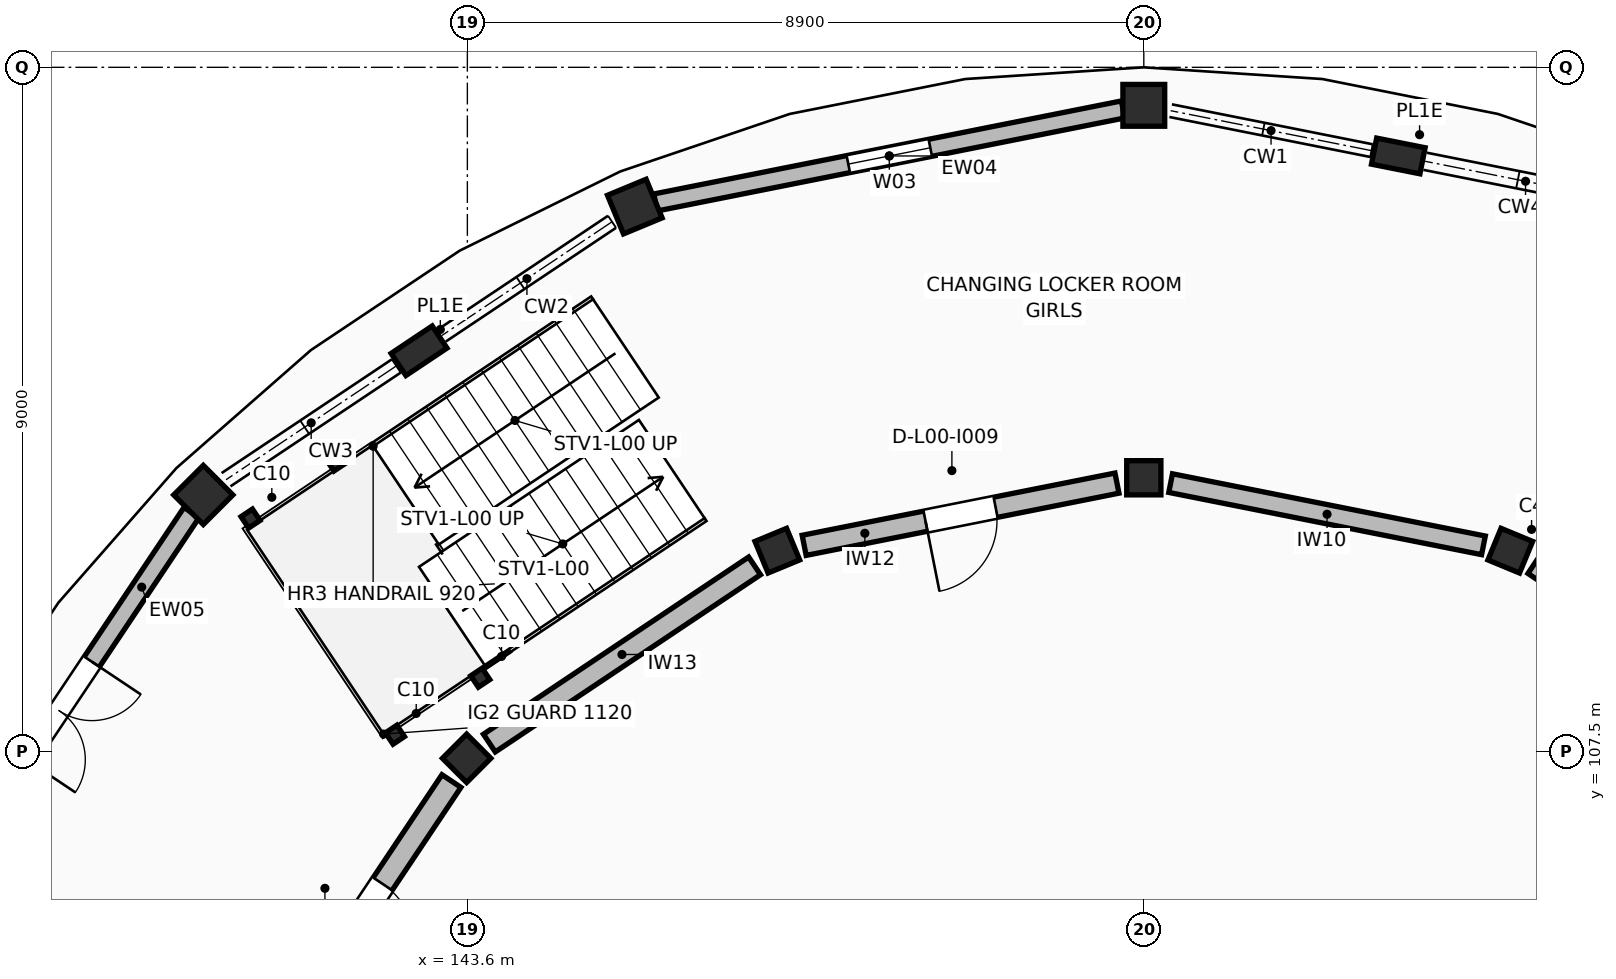
"""IFC4 building model, lengths in metres.
Left out: names, types, materials, properties, quantities, classifications, styles, units other than length and angle.
Written with IfcOpenShell. Run it as: python <this file> out.ifc"""

import sys

from ifc_helpers import new_model, si_unit, direction, frame, frame_2d, origin, origin_2d, place, context, subcontext, project, spatial, rectangle, hollow_rectangle, extrude, element, fill, save


model = new_model("IFC4")
c1 = context("Model", 3, precision=1e-05, world=origin(), true_north=direction((0.0, 1.0)))
c2 = subcontext(c1, "Body", "Model", "MODEL_VIEW")
j1 = project(units=[si_unit("LENGTHUNIT", "METRE"), si_unit("PLANEANGLEUNIT", "RADIAN")], contexts=[c1])
p1 = place(None, origin())
s1 = spatial("IfcSite", under=j1, at=p1, CompositionType="ELEMENT")
p2 = place(p1, origin())
s2 = spatial("IfcBuilding", under=s1, at=p2, CompositionType="ELEMENT")
p3 = place(p2, origin())
s3 = spatial("IfcBuildingStorey", under=s2, at=p3, CompositionType="ELEMENT", Elevation=0.0)
for number, where, z_axis, x_axis in (
    (1, (157.322, 110.141, 0.0), (0.0, 0.0, 1.0), (0.383, 0.924, 0.0)),
    (2, (152.5, 111.1, 0.0), (0.0, 0.0, 1.0), (0.0, 1.0, 0.0)),
):
    element("IfcColumn", number, at=place(p3, frame(where, z_axis=z_axis, x_axis=x_axis)), inside=s3, PredefinedType="COLUMN", context=c2, shape_type="SweptSolid", body=[
        extrude(rectangle(XDim=0.45, YDim=0.45, at=origin_2d()), origin(), (0.0, 0.0, 1.0), 4.42),
    ])
p4 = place(p3, frame((152.5, 116.0, 0.0), z_axis=(0.0, 0.0, 1.0), x_axis=(0.0, 1.0, 0.0)))
e3 = element("IfcColumn", 3, at=p4, inside=s3, PredefinedType="COLUMN", context=c2, shape_type="SweptSolid", body=[
    extrude(rectangle(XDim=0.55, YDim=0.55, at=origin_2d()), origin(), (0.0, 0.0, 1.0), 4.42),
])
p5 = place(p3, frame((147.678, 110.141, 0.0), z_axis=(0.0, 0.0, 1.0), x_axis=(-0.382683432365, 0.923879532511, 0.0)))
e4 = element("IfcColumn", 4, at=p5, inside=s3, PredefinedType="COLUMN", context=c2, shape_type="SweptSolid", body=[
    extrude(rectangle(XDim=0.45, YDim=0.45, at=origin_2d()), origin(), (0.0, 0.0, 1.0), 4.42),
])
p6 = place(p3, frame((145.803, 114.668, 0.0), z_axis=(0.0, 0.0, 1.0), x_axis=(-0.382683432365, 0.923879532511, 0.0)))
e5 = element("IfcColumn", 5, at=p6, inside=s3, PredefinedType="COLUMN", context=c2, shape_type="SweptSolid", body=[
    extrude(rectangle(XDim=0.55, YDim=0.55, at=origin_2d()), origin(), (0.0, 0.0, 1.0), 4.42),
])
p7 = place(p3, frame((143.591, 107.409, 0.0), z_axis=(0.0, 0.0, 1.0), x_axis=(-0.707106781187, 0.707106781187, 0.0)))
e6 = element("IfcColumn", 6, at=p7, inside=s3, PredefinedType="COLUMN", context=c2, shape_type="SweptSolid", body=[
    extrude(rectangle(XDim=0.45, YDim=0.45, at=origin_2d()), origin(), (0.0, 0.0, 1.0), 4.42),
])
p8 = place(p3, frame((140.126, 110.874, 0.0), z_axis=(0.0, 0.0, 1.0), x_axis=(-0.707106781187, 0.707106781187, 0.0)))
e7 = element("IfcColumn", 7, at=p8, inside=s3, PredefinedType="COLUMN", context=c2, shape_type="SweptSolid", body=[
    extrude(rectangle(XDim=0.55, YDim=0.55, at=origin_2d()), origin(), (0.0, 0.0, 1.0), 4.42),
])
for number, where, z_axis, x_axis in (
    (8, (155.848, 115.334, 0.0), (0.0, 0.0, 1.0), (0.195, 0.981, 0.0)),
    (9, (142.964, 112.771, 0.0), (0.0, 0.0, 1.0), (-0.556, 0.831, 0.0)),
):
    element("IfcColumn", number, at=place(p3, frame(where, z_axis=z_axis, x_axis=x_axis)), inside=s3, PredefinedType="PILASTER", context=c2, shape_type="SweptSolid", body=[
        extrude(rectangle(XDim=0.35, YDim=0.65, at=origin_2d()), origin(), (0.0, 0.0, 1.0), 4.42),
    ])
p9 = place(p3, frame((152.227, 115.946, 0.0), z_axis=(0.0, 0.0, 1.0), x_axis=(-0.980785242574, -0.195090512195, 0.0)))
e10 = element("IfcWall", 10, at=p9, inside=s3, PredefinedType="STANDARD", context=c2, shape_type="SweptSolid", body=[
    extrude(rectangle(XDim=6.272, YDim=0.228, at=frame_2d((3.136, 0.0))), origin(), (0.0, 0.0, 1.0), 3.4),
])
p10 = place(p9, frame((2.586, 0.0, 0.95)))
e11 = element("IfcOpeningElement", 11, at=p10, cuts=e10, PredefinedType="OPENING", context=c2, shape_type="SweptSolid", body=[
    extrude(rectangle(XDim=1.1, YDim=1.45, at=frame_2d((0.55, 0.725))), frame((0.0, 0.124, 0.0), z_axis=(0.0, -1.0, 0.0), x_axis=(1.0, 0.0, 0.0)), (0.0, 0.0, 1.0), 0.248),
])
p11 = place(p3, frame((139.971, 110.643, 0.0), z_axis=(0.0, 0.0, 1.0), x_axis=(-0.555571204893, -0.831468962917, 0.0)))
e12 = element("IfcWall", 12, at=p11, inside=s3, PredefinedType="STANDARD", context=c2, shape_type="SweptSolid", body=[
    extrude(rectangle(XDim=6.272, YDim=0.24, at=frame_2d((3.136, 0.0))), origin(), (0.0, 0.0, 1.0), 3.4),
])
p12 = place(p11, frame((2.361, 0.0, 0.0)))
e13 = element("IfcOpeningElement", 13, at=p12, cuts=e12, PredefinedType="OPENING", context=c2, shape_type="SweptSolid", body=[
    extrude(rectangle(XDim=1.55, YDim=2.22, at=frame_2d((0.775, 1.11))), frame((0.0, 0.13, 0.0), z_axis=(0.0, -1.0, 0.0), x_axis=(1.0, 0.0, 0.0)), (0.0, 0.0, 1.0), 0.26),
])
for number, where, z_axis, x_axis in (
    (14, (141.87, 111.313, 0.0), (0.0, 0.0, 1.0), (-0.831, -0.556, 0.0)),
    (15, (143.77, 108.47, 0.0), (0.0, 0.0, 1.0), (-0.831, -0.556, 0.0)),
    (16, (140.747, 110.563, 0.0), (0.0, 0.0, 1.0), (-0.831, -0.556, 0.0)),
    (17, (142.647, 107.72, 0.0), (0.0, 0.0, 1.0), (-0.831, -0.556, 0.0)),
):
    element("IfcColumn", number, at=place(p3, frame(where, z_axis=z_axis, x_axis=x_axis)), inside=s3, PredefinedType="COLUMN", context=c2, shape_type="SweptSolid", body=[
        extrude(hollow_rectangle(XDim=0.18, YDim=0.18, WallThickness=0.01, InnerFilletRadius=0.01, OuterFilletRadius=0.02, at=origin_2d()), origin(), (0.0, 0.0, 1.0), 2.015),
    ])
p13 = place(p3, frame((161.11, 107.61, 0.0), z_axis=(0.0, 0.0, 1.0), x_axis=(-0.831468024304, 0.55557260962, 0.0)))
e18 = element("IfcWall", 18, at=p13, inside=s3, PredefinedType="STANDARD", context=c2, shape_type="SweptSolid", body=[
    extrude(rectangle(XDim=4.196, YDim=0.24, at=frame_2d((2.098, 0.0))), origin(), (0.0, 0.0, 1.0), 3.38),
])
p14 = place(p13, frame((1.648, 0.0, 0.0)))
e19 = element("IfcOpeningElement", 19, at=p14, cuts=e18, PredefinedType="OPENING", context=c2, shape_type="SweptSolid", body=[
    extrude(rectangle(XDim=0.9, YDim=2.24, at=frame_2d((0.45, 1.12))), frame((0.0, 0.13, 0.0), z_axis=(0.0, -1.0, 0.0), x_axis=(1.0, 0.0, 0.0)), (0.0, 0.0, 1.0), 0.26),
])
p15 = place(p3, frame((156.969, 110.211, 0.0), z_axis=(0.0, 0.0, 1.0), x_axis=(-0.980788226851, 0.195075508639, 0.0)))
e20 = element("IfcWall", 20, at=p15, inside=s3, PredefinedType="STANDARD", context=c2, shape_type="SweptSolid", body=[
    extrude(rectangle(XDim=4.196, YDim=0.25, at=frame_2d((2.098, 0.0))), origin(), (0.0, 0.0, 1.0), 3.38),
])
p16 = place(p3, frame((152.147, 111.03, 0.0), z_axis=(0.0, 0.0, 1.0), x_axis=(-0.980788226851, -0.195075508639, 0.0)))
e21 = element("IfcWall", 21, at=p16, inside=s3, PredefinedType="STANDARD", context=c2, shape_type="SweptSolid", body=[
    extrude(rectangle(XDim=4.196, YDim=0.27, at=frame_2d((2.098, 0.0))), origin(), (0.0, 0.0, 1.0), 3.38),
])
p17 = place(p16, frame((1.628, 0.0, 0.0)))
e22 = element("IfcOpeningElement", 22, at=p17, cuts=e21, PredefinedType="OPENING", context=c2, shape_type="SweptSolid", body=[
    extrude(rectangle(XDim=0.94, YDim=2.12, at=frame_2d((0.47, 1.06))), frame((0.0, 0.145, 0.0), z_axis=(0.0, -1.0, 0.0), x_axis=(1.0, 0.0, 0.0)), (0.0, 0.0, 1.0), 0.29),
])
p18 = place(p3, frame((147.379, 109.941, 0.0), z_axis=(0.0, 0.0, 1.0), x_axis=(-0.831468024304, -0.55557260962, 0.0)))
e23 = element("IfcWall", 23, at=p18, inside=s3, PredefinedType="STANDARD", context=c2, shape_type="SweptSolid", body=[
    extrude(rectangle(XDim=4.196, YDim=0.28, at=frame_2d((2.098, 0.0))), origin(), (0.0, 0.0, 1.0), 3.38),
])
p19 = place(p3, frame((143.39, 107.11, 0.0), z_axis=(0.0, 0.0, 1.0), x_axis=(-0.55557260962, -0.831468024304, 0.0)))
e24 = element("IfcWall", 24, at=p19, inside=s3, PredefinedType="STANDARD", context=c2, shape_type="SweptSolid", body=[
    extrude(rectangle(XDim=4.196, YDim=0.3, at=frame_2d((2.098, 0.0))), origin(), (0.0, 0.0, 1.0), 3.38),
])
p20 = place(p19, frame((1.628, 0.0, 0.0)))
e25 = element("IfcOpeningElement", 25, at=p20, cuts=e24, PredefinedType="OPENING", context=c2, shape_type="SweptSolid", body=[
    extrude(rectangle(XDim=0.94, YDim=2.24, at=frame_2d((0.47, 1.12))), frame((0.0, 0.16, 0.0), z_axis=(0.0, -1.0, 0.0), x_axis=(1.0, 0.0, 0.0)), (0.0, 0.0, 1.0), 0.32),
])
p21 = place(p10, origin())
e26 = element("IfcWindow", 26, at=p21, inside=s3, PartitioningType="SINGLE_PANEL", PredefinedType="WINDOW", context=c2, shape_type="SweptSolid", body=[
    extrude(rectangle(XDim=1.1, YDim=1.45, at=frame_2d((0.55, 0.725))), frame((0.0, 0.03, 0.0), z_axis=(0.0, -1.0, 0.0), x_axis=(1.0, 0.0, 0.0)), (0.0, 0.0, 1.0), 0.06),
])
fill(e11, e26)
p22 = place(p12, frame((1.55, 0.0, 0.0), z_axis=(0.0, 0.0, 1.0), x_axis=(-1.0, 0.0, 0.0)))
e27 = element("IfcDoor", 27, at=p22, inside=s3, OperationType="DOUBLE_DOOR_SINGLE_SWING", PredefinedType="DOOR", context=c2, shape_type="SweptSolid", body=[
    extrude(rectangle(XDim=1.55, YDim=2.22, at=frame_2d((0.775, 1.11))), frame((0.0, 0.025, 0.0), z_axis=(0.0, -1.0, 0.0), x_axis=(1.0, 0.0, 0.0)), (0.0, 0.0, 1.0), 0.05),
])
fill(e13, e27)
p23 = place(p17, frame((0.94, 0.0, 0.0), z_axis=(0.0, 0.0, 1.0), x_axis=(-1.0, 0.0, 0.0)))
e28 = element("IfcDoor", 28, at=p23, inside=s3, OperationType="SINGLE_SWING_RIGHT", PredefinedType="DOOR", context=c2, shape_type="SweptSolid", body=[
    extrude(rectangle(XDim=0.94, YDim=2.12, at=frame_2d((0.47, 1.06))), frame((0.0, 0.025, 0.0), z_axis=(0.0, -1.0, 0.0), x_axis=(1.0, 0.0, 0.0)), (0.0, 0.0, 1.0), 0.05),
])
fill(e22, e28)
p24 = place(p20, frame((0.94, 0.0, 0.0), z_axis=(0.0, 0.0, 1.0), x_axis=(-1.0, 0.0, 0.0)))
e29 = element("IfcDoor", 29, at=p24, inside=s3, OperationType="SINGLE_SWING_RIGHT", PredefinedType="DOOR", context=c2, shape_type="SweptSolid", body=[
    extrude(rectangle(XDim=0.94, YDim=2.24, at=frame_2d((0.47, 1.12))), frame((0.0, 0.025, 0.0), z_axis=(0.0, -1.0, 0.0), x_axis=(1.0, 0.0, 0.0)), (0.0, 0.0, 1.0), 0.05),
])
fill(e25, e29)
save(model, sys.argv[1])
